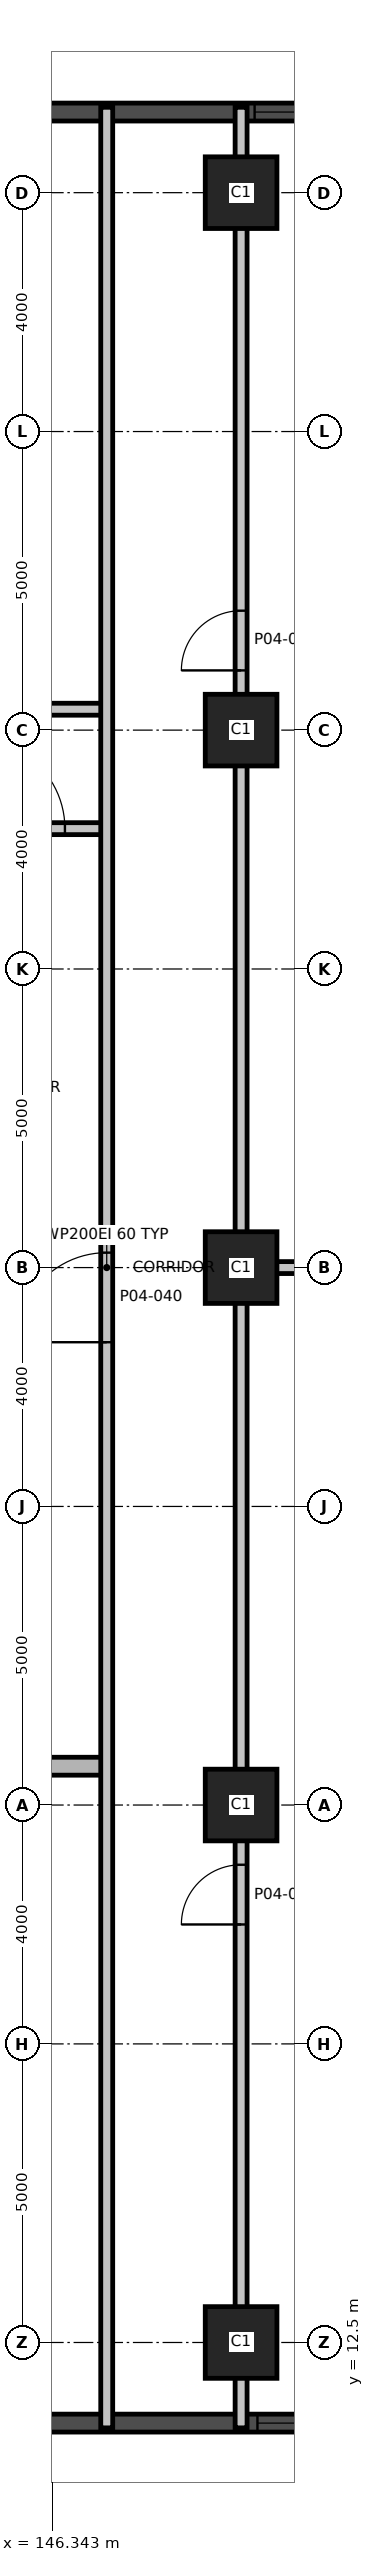
"""IFC4 building model, lengths in metres.
Left out: names, types, materials, properties, quantities, classifications, styles, units other than length and angle.
Written with IfcOpenShell. Run it as: python <this file> out.ifc"""

import sys

from ifc_helpers import new_model, si_unit, direction, frame, frame_2d, origin, origin_2d, place, context, subcontext, project, spatial, rectangle, extrude, element, fill, save


model = new_model("IFC4")
c1 = context("Model", 3, precision=1e-05, world=origin(), true_north=direction((0.0, 1.0)))
c2 = subcontext(c1, "Body", "Model", "MODEL_VIEW")
j1 = project(units=[si_unit("LENGTHUNIT", "METRE"), si_unit("PLANEANGLEUNIT", "RADIAN")], contexts=[c1])
p1 = place(None, origin())
s1 = spatial("IfcSite", under=j1, at=p1, CompositionType="ELEMENT")
p2 = place(p1, origin())
s2 = spatial("IfcBuilding", under=s1, at=p2, CompositionType="ELEMENT")
p3 = place(p2, frame((0.0, 0.0, 23.5)))
s3 = spatial("IfcBuildingStorey", under=s2, at=p3, CompositionType="ELEMENT", Elevation=23.5)
for number, where, z_axis, x_axis in (
    (1, (149.5, 12.5, 0.0), (0.0, 0.0, 1.0), (1.0, 0.0, 0.0)),
    (2, (149.5, 21.5, 0.0), (0.0, 0.0, 1.0), (1.0, 0.0, 0.0)),
    (3, (149.5, 30.5, 0.0), (0.0, 0.0, 1.0), (1.0, 0.0, 0.0)),
    (4, (149.5, 39.5, 0.0), (0.0, 0.0, 1.0), (1.0, 0.0, 0.0)),
    (5, (149.5, 48.5, 0.0), (0.0, 0.0, 1.0), (1.0, 0.0, 0.0)),
):
    element("IfcColumn", number, at=place(p3, frame(where, z_axis=z_axis, x_axis=x_axis)), inside=s3, PredefinedType="COLUMN", context=c2, shape_type="SweptSolid", body=[
        extrude(rectangle(XDim=1.2, YDim=1.2, at=origin_2d()), origin(), (0.0, 0.0, 1.0), 5.0),
    ])
p4 = place(p3, frame((118.048, 11.15, 0.0), z_axis=(0.0, 0.0, 1.0), x_axis=(1.0, 0.0, 0.0)))
e6 = element("IfcWall", 6, at=p4, inside=s3, PredefinedType="SOLIDWALL", context=c2, shape_type="SweptSolid", body=[
    extrude(rectangle(XDim=35.88, YDim=0.3, at=frame_2d((17.94, 0.0))), origin(), (0.0, 0.0, 1.0), 4.7),
])
p5 = place(p4, frame((4.202, 0.0, 0.9)))
e7 = element("IfcOpeningElement", 7, at=p5, cuts=e6, PredefinedType="OPENING", context=c2, shape_type="SweptSolid", body=[
    extrude(rectangle(XDim=3.0, YDim=2.4, at=frame_2d((1.5, 1.2))), frame((0.0, 0.16, 0.0), z_axis=(0.0, -1.0, 0.0), x_axis=(1.0, 0.0, 0.0)), (0.0, 0.0, 1.0), 0.32),
])
p6 = place(p4, frame((8.702, 0.0, 0.9)))
e8 = element("IfcOpeningElement", 8, at=p6, cuts=e6, PredefinedType="OPENING", context=c2, shape_type="SweptSolid", body=[
    extrude(rectangle(XDim=3.0, YDim=2.4, at=frame_2d((1.5, 1.2))), frame((0.0, 0.16, 0.0), z_axis=(0.0, -1.0, 0.0), x_axis=(1.0, 0.0, 0.0)), (0.0, 0.0, 1.0), 0.32),
])
p7 = place(p4, frame((13.202, 0.0, 0.9)))
e9 = element("IfcOpeningElement", 9, at=p7, cuts=e6, PredefinedType="OPENING", context=c2, shape_type="SweptSolid", body=[
    extrude(rectangle(XDim=3.0, YDim=2.4, at=frame_2d((1.5, 1.2))), frame((0.0, 0.16, 0.0), z_axis=(0.0, -1.0, 0.0), x_axis=(1.0, 0.0, 0.0)), (0.0, 0.0, 1.0), 0.32),
])
p8 = place(p4, frame((17.702, 0.0, 0.9)))
e10 = element("IfcOpeningElement", 10, at=p8, cuts=e6, PredefinedType="OPENING", context=c2, shape_type="SweptSolid", body=[
    extrude(rectangle(XDim=3.0, YDim=2.4, at=frame_2d((1.5, 1.2))), frame((0.0, 0.16, 0.0), z_axis=(0.0, -1.0, 0.0), x_axis=(1.0, 0.0, 0.0)), (0.0, 0.0, 1.0), 0.32),
])
p9 = place(p4, frame((22.202, 0.0, 0.9)))
e11 = element("IfcOpeningElement", 11, at=p9, cuts=e6, PredefinedType="OPENING", context=c2, shape_type="SweptSolid", body=[
    extrude(rectangle(XDim=3.0, YDim=2.4, at=frame_2d((1.5, 1.2))), frame((0.0, 0.16, 0.0), z_axis=(0.0, -1.0, 0.0), x_axis=(1.0, 0.0, 0.0)), (0.0, 0.0, 1.0), 0.32),
])
p10 = place(p4, frame((31.726, 0.0, 0.9)))
e12 = element("IfcOpeningElement", 12, at=p10, cuts=e6, PredefinedType="OPENING", context=c2, shape_type="SweptSolid", body=[
    extrude(rectangle(XDim=3.0, YDim=2.4, at=frame_2d((1.5, 1.2))), frame((0.0, 0.16, 0.0), z_axis=(0.0, -1.0, 0.0), x_axis=(1.0, 0.0, 0.0)), (0.0, 0.0, 1.0), 0.32),
])
p11 = place(p3, frame((153.952, 49.85, 0.0), z_axis=(0.0, 0.0, 1.0), x_axis=(-1.0, 0.0, 0.0)))
e13 = element("IfcWall", 13, at=p11, inside=s3, PredefinedType="SOLIDWALL", context=c2, shape_type="SweptSolid", body=[
    extrude(rectangle(XDim=35.88, YDim=0.3, at=frame_2d((17.94, 0.0))), origin(), (0.0, 0.0, 1.0), 4.7),
])
p12 = place(p11, frame((1.226, 0.0, 0.9)))
e14 = element("IfcOpeningElement", 14, at=p12, cuts=e13, PredefinedType="OPENING", context=c2, shape_type="SweptSolid", body=[
    extrude(rectangle(XDim=3.0, YDim=2.4, at=frame_2d((1.5, 1.2))), frame((0.0, 0.16, 0.0), z_axis=(0.0, -1.0, 0.0), x_axis=(1.0, 0.0, 0.0)), (0.0, 0.0, 1.0), 0.32),
])
p13 = place(p11, frame((10.702, 0.0, 0.9)))
e15 = element("IfcOpeningElement", 15, at=p13, cuts=e13, PredefinedType="OPENING", context=c2, shape_type="SweptSolid", body=[
    extrude(rectangle(XDim=3.0, YDim=2.4, at=frame_2d((1.5, 1.2))), frame((0.0, 0.16, 0.0), z_axis=(0.0, -1.0, 0.0), x_axis=(1.0, 0.0, 0.0)), (0.0, 0.0, 1.0), 0.32),
])
p14 = place(p11, frame((15.202, 0.0, 0.9)))
e16 = element("IfcOpeningElement", 16, at=p14, cuts=e13, PredefinedType="OPENING", context=c2, shape_type="SweptSolid", body=[
    extrude(rectangle(XDim=3.0, YDim=2.4, at=frame_2d((1.5, 1.2))), frame((0.0, 0.16, 0.0), z_axis=(0.0, -1.0, 0.0), x_axis=(1.0, 0.0, 0.0)), (0.0, 0.0, 1.0), 0.32),
])
p15 = place(p11, frame((19.702, 0.0, 0.9)))
e17 = element("IfcOpeningElement", 17, at=p15, cuts=e13, PredefinedType="OPENING", context=c2, shape_type="SweptSolid", body=[
    extrude(rectangle(XDim=3.0, YDim=2.4, at=frame_2d((1.5, 1.2))), frame((0.0, 0.16, 0.0), z_axis=(0.0, -1.0, 0.0), x_axis=(1.0, 0.0, 0.0)), (0.0, 0.0, 1.0), 0.32),
])
p16 = place(p11, frame((24.202, 0.0, 0.9)))
e18 = element("IfcOpeningElement", 18, at=p16, cuts=e13, PredefinedType="OPENING", context=c2, shape_type="SweptSolid", body=[
    extrude(rectangle(XDim=3.0, YDim=2.4, at=frame_2d((1.5, 1.2))), frame((0.0, 0.16, 0.0), z_axis=(0.0, -1.0, 0.0), x_axis=(1.0, 0.0, 0.0)), (0.0, 0.0, 1.0), 0.32),
])
p17 = place(p11, frame((28.702, 0.0, 0.9)))
e19 = element("IfcOpeningElement", 19, at=p17, cuts=e13, PredefinedType="OPENING", context=c2, shape_type="SweptSolid", body=[
    extrude(rectangle(XDim=3.0, YDim=2.4, at=frame_2d((1.5, 1.2))), frame((0.0, 0.16, 0.0), z_axis=(0.0, -1.0, 0.0), x_axis=(1.0, 0.0, 0.0)), (0.0, 0.0, 1.0), 0.32),
])
p18 = place(p3, frame((125.75, 22.15, 0.0), z_axis=(0.0, 0.0, 1.0), x_axis=(1.0, 0.0, 0.0)))
e20 = element("IfcWall", 20, at=p18, inside=s3, PredefinedType="SHEAR", context=c2, shape_type="SweptSolid", body=[
    extrude(rectangle(XDim=21.5, YDim=0.3, at=frame_2d((10.75, 0.0))), origin(), (0.0, 0.0, 1.0), 4.7),
])
p19 = place(p18, frame((17.0, 0.0, 0.0)))
e21 = element("IfcOpeningElement", 21, at=p19, cuts=e20, PredefinedType="OPENING", context=c2, shape_type="SweptSolid", body=[
    extrude(rectangle(XDim=1.0, YDim=2.1, at=frame_2d((0.5, 1.05))), frame((0.0, 0.16, 0.0), z_axis=(0.0, -1.0, 0.0), x_axis=(1.0, 0.0, 0.0)), (0.0, 0.0, 1.0), 0.32),
])
p20 = place(p18, frame((6.75, 0.0, 0.0)))
e22 = element("IfcOpeningElement", 22, at=p20, cuts=e20, PredefinedType="OPENING", context=c2, shape_type="SweptSolid", body=[
    extrude(rectangle(XDim=1.0, YDim=2.1, at=frame_2d((0.5, 1.05))), frame((0.0, 0.16, 0.0), z_axis=(0.0, -1.0, 0.0), x_axis=(1.0, 0.0, 0.0)), (0.0, 0.0, 1.0), 0.32),
])
p21 = place(p3, frame((149.5, 30.5, 0.0), z_axis=(0.0, 0.0, 1.0), x_axis=(1.0, 0.0, 0.0)))
e23 = element("IfcWall", 23, at=p21, inside=s3, PredefinedType="PARTITIONING", context=c2, shape_type="SweptSolid", body=[
    extrude(rectangle(XDim=10.43, YDim=0.2, at=frame_2d((5.215, 0.0))), origin(), (0.0, 0.0, 1.0), 4.7),
])
p22 = place(p3, frame((144.02, 37.85, 0.0), z_axis=(0.0, 0.0, 1.0), x_axis=(1.0, 0.0, 0.0)))
e24 = element("IfcWall", 24, at=p22, inside=s3, PredefinedType="PARTITIONING", context=c2, shape_type="SweptSolid", body=[
    extrude(rectangle(XDim=3.23, YDim=0.2, at=frame_2d((1.615, 0.0))), origin(), (0.0, 0.0, 1.0), 4.7),
])
p23 = place(p22, frame((1.03, 0.0, 0.0)))
e25 = element("IfcOpeningElement", 25, at=p23, cuts=e24, PredefinedType="OPENING", context=c2, shape_type="SweptSolid", body=[
    extrude(rectangle(XDim=1.5, YDim=2.1, at=frame_2d((0.75, 1.05))), frame((0.0, 0.11, 0.0), z_axis=(0.0, -1.0, 0.0), x_axis=(1.0, 0.0, 0.0)), (0.0, 0.0, 1.0), 0.22),
])
p24 = place(p3, frame((143.0, 39.85, 0.0), z_axis=(0.0, 0.0, 1.0), x_axis=(1.0, 0.0, 0.0)))
e26 = element("IfcWall", 26, at=p24, inside=s3, PredefinedType="PARTITIONING", context=c2, shape_type="SweptSolid", body=[
    extrude(rectangle(XDim=4.25, YDim=0.2, at=frame_2d((2.125, 0.0))), origin(), (0.0, 0.0, 1.0), 4.7),
])
p25 = place(p3, frame((147.25, 11.07, 0.0), z_axis=(0.0, 0.0, 1.0), x_axis=(0.0, 1.0, 0.0)))
e27 = element("IfcWall", 27, at=p25, inside=s3, PredefinedType="PARTITIONING", context=c2, shape_type="SweptSolid", body=[
    extrude(rectangle(XDim=38.86, YDim=0.2, at=frame_2d((19.43, 0.0))), origin(), (0.0, 0.0, 1.0), 4.7),
])
p26 = place(p25, frame((18.18, 0.0, 0.0)))
e28 = element("IfcOpeningElement", 28, at=p26, cuts=e27, PredefinedType="OPENING", context=c2, shape_type="SweptSolid", body=[
    extrude(rectangle(XDim=1.5, YDim=2.1, at=frame_2d((0.75, 1.05))), frame((0.0, 0.11, 0.0), z_axis=(0.0, -1.0, 0.0), x_axis=(1.0, 0.0, 0.0)), (0.0, 0.0, 1.0), 0.22),
])
p27 = place(p3, frame((149.5, 11.07, 0.0), z_axis=(0.0, 0.0, 1.0), x_axis=(0.0, 1.0, 0.0)))
e29 = element("IfcWall", 29, at=p27, inside=s3, PredefinedType="PARTITIONING", context=c2, shape_type="SweptSolid", body=[
    extrude(rectangle(XDim=38.86, YDim=0.2, at=frame_2d((19.43, 0.0))), origin(), (0.0, 0.0, 1.0), 4.7),
])
p28 = place(p27, frame((8.43, 0.0, 0.0)))
e30 = element("IfcOpeningElement", 30, at=p28, cuts=e29, PredefinedType="OPENING", context=c2, shape_type="SweptSolid", body=[
    extrude(rectangle(XDim=1.0, YDim=2.1, at=frame_2d((0.5, 1.05))), frame((0.0, 0.11, 0.0), z_axis=(0.0, -1.0, 0.0), x_axis=(1.0, 0.0, 0.0)), (0.0, 0.0, 1.0), 0.22),
])
p29 = place(p27, frame((29.43, 0.0, 0.0)))
e31 = element("IfcOpeningElement", 31, at=p29, cuts=e29, PredefinedType="OPENING", context=c2, shape_type="SweptSolid", body=[
    extrude(rectangle(XDim=1.0, YDim=2.1, at=frame_2d((0.5, 1.05))), frame((0.0, 0.11, 0.0), z_axis=(0.0, -1.0, 0.0), x_axis=(1.0, 0.0, 0.0)), (0.0, 0.0, 1.0), 0.22),
])
p30 = place(p10, origin())
e32 = element("IfcWindow", 32, at=p30, inside=s3, PartitioningType="SINGLE_PANEL", PredefinedType="WINDOW", context=c2, shape_type="SweptSolid", body=[
    extrude(rectangle(XDim=3.0, YDim=2.4, at=frame_2d((1.5, 1.2))), frame((0.0, 0.03, 0.0), z_axis=(0.0, -1.0, 0.0), x_axis=(1.0, 0.0, 0.0)), (0.0, 0.0, 1.0), 0.06),
])
fill(e12, e32)
p31 = place(p12, origin())
e33 = element("IfcWindow", 33, at=p31, inside=s3, PartitioningType="SINGLE_PANEL", PredefinedType="WINDOW", context=c2, shape_type="SweptSolid", body=[
    extrude(rectangle(XDim=3.0, YDim=2.4, at=frame_2d((1.5, 1.2))), frame((0.0, 0.03, 0.0), z_axis=(0.0, -1.0, 0.0), x_axis=(1.0, 0.0, 0.0)), (0.0, 0.0, 1.0), 0.06),
])
fill(e14, e33)
p32 = place(p23, origin())
e34 = element("IfcDoor", 34, at=p32, inside=s3, OperationType="SINGLE_SWING_LEFT", PredefinedType="DOOR", context=c2, shape_type="SweptSolid", body=[
    extrude(rectangle(XDim=1.5, YDim=2.1, at=frame_2d((0.75, 1.05))), frame((0.0, 0.025, 0.0), z_axis=(0.0, -1.0, 0.0), x_axis=(1.0, 0.0, 0.0)), (0.0, 0.0, 1.0), 0.05),
])
fill(e25, e34)
p33 = place(p26, origin())
e35 = element("IfcDoor", 35, at=p33, inside=s3, OperationType="SINGLE_SWING_RIGHT", PredefinedType="DOOR", context=c2, shape_type="SweptSolid", body=[
    extrude(rectangle(XDim=1.5, YDim=2.1, at=frame_2d((0.75, 1.05))), frame((0.0, 0.025, 0.0), z_axis=(0.0, -1.0, 0.0), x_axis=(1.0, 0.0, 0.0)), (0.0, 0.0, 1.0), 0.05),
])
fill(e28, e35)
p34 = place(p28, origin())
e36 = element("IfcDoor", 36, at=p34, inside=s3, OperationType="SINGLE_SWING_LEFT", PredefinedType="DOOR", context=c2, shape_type="SweptSolid", body=[
    extrude(rectangle(XDim=1.0, YDim=2.1, at=frame_2d((0.5, 1.05))), frame((0.0, 0.025, 0.0), z_axis=(0.0, -1.0, 0.0), x_axis=(1.0, 0.0, 0.0)), (0.0, 0.0, 1.0), 0.05),
])
fill(e30, e36)
p35 = place(p29, origin())
e37 = element("IfcDoor", 37, at=p35, inside=s3, OperationType="SINGLE_SWING_RIGHT", PredefinedType="DOOR", context=c2, shape_type="SweptSolid", body=[
    extrude(rectangle(XDim=1.0, YDim=2.1, at=frame_2d((0.5, 1.05))), frame((0.0, 0.025, 0.0), z_axis=(0.0, -1.0, 0.0), x_axis=(1.0, 0.0, 0.0)), (0.0, 0.0, 1.0), 0.05),
])
fill(e31, e37)
save(model, sys.argv[1])
